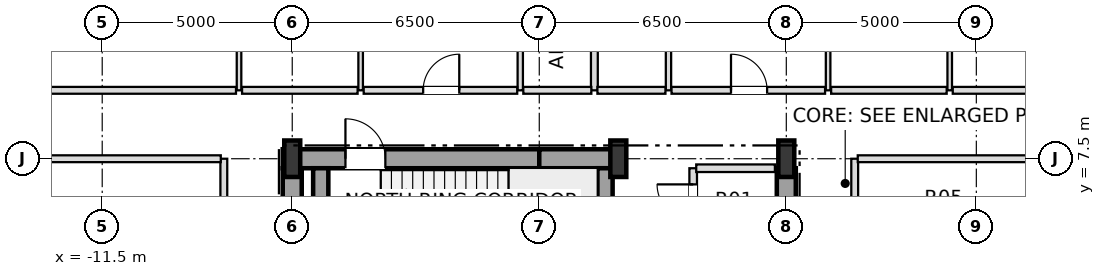
"""IFC4 building model, lengths in metres.
Left out: names, types, materials, properties, quantities, classifications, styles, units other than length and angle.
Written with IfcOpenShell. Run it as: python <this file> out.ifc"""

import sys

from ifc_helpers import new_model, si_unit, direction, frame, frame_2d, origin, origin_2d, place, context, subcontext, project, spatial, rectangle, i_section, extrude, element, fill, save


model = new_model("IFC4")
c1 = context("Model", 3, precision=1e-05, world=origin(), true_north=direction((0.0, 1.0)))
c2 = subcontext(c1, "Body", "Model", "MODEL_VIEW")
j1 = project(units=[si_unit("LENGTHUNIT", "METRE"), si_unit("PLANEANGLEUNIT", "RADIAN")], contexts=[c1])
p1 = place(None, origin())
s1 = spatial("IfcSite", under=j1, at=p1, CompositionType="ELEMENT")
p2 = place(p1, origin())
s2 = spatial("IfcBuilding", under=s1, at=p2, CompositionType="ELEMENT")
p3 = place(p2, frame((0.0, 0.0, 27.6)))
s3 = spatial("IfcBuildingStorey", under=s2, at=p3, CompositionType="ELEMENT", Elevation=27.6)
for number, where, z_axis, x_axis in (
    (1, (-6.5, 7.5, 0.0), (0.0, 0.0, 1.0), (1.0, 0.0, 0.0)),
    (2, (2.08, 7.5, 0.0), (0.0, 0.0, 1.0), (1.0, 0.0, 0.0)),
    (3, (6.5, 7.5, 0.0), (0.0, 0.0, 1.0), (1.0, 0.0, 0.0)),
):
    element("IfcColumn", number, at=place(p3, frame(where, z_axis=z_axis, x_axis=x_axis)), inside=s3, PredefinedType="COLUMN", context=c2, shape_type="SweptSolid", body=[
        extrude(i_section(OverallWidth=0.42, OverallDepth=0.96, WebThickness=0.022, FlangeThickness=0.034, at=origin_2d()), origin(), (0.0, 0.0, 1.0), 4.8),
    ])
p4 = place(p3, frame((-6.75, 7.5, 0.0), z_axis=(0.0, 0.0, 1.0), x_axis=(1.0, 0.0, 0.0)))
e4 = element("IfcWall", 4, at=p4, inside=s3, PredefinedType="SHEAR", context=c2, shape_type="SweptSolid", body=[
    extrude(rectangle(XDim=6.75, YDim=0.5, at=frame_2d((3.375, 0.0))), origin(), (0.0, 0.0, 1.0), 4.58),
])
p5 = place(p4, frame((1.65, 0.0, 0.0)))
e5 = element("IfcOpeningElement", 5, at=p5, cuts=e4, PredefinedType="OPENING", context=c2, shape_type="SweptSolid", body=[
    extrude(rectangle(XDim=1.05, YDim=2.15, at=frame_2d((0.525, 1.075))), frame((0.0, 0.26, 0.0), z_axis=(0.0, -1.0, 0.0), x_axis=(1.0, 0.0, 0.0)), (0.0, 0.0, 1.0), 0.52),
])
p6 = place(p3, frame((0.0, 7.5, 0.0), z_axis=(0.0, 0.0, 1.0), x_axis=(1.0, 0.0, 0.0)))
e6 = element("IfcWall", 6, at=p6, inside=s3, PredefinedType="SHEAR", context=c2, shape_type="SweptSolid", body=[
    extrude(rectangle(XDim=2.08, YDim=0.5, at=frame_2d((1.04, 0.0))), origin(), (0.0, 0.0, 1.0), 4.58),
])
for number, where, z_axis, x_axis in (
    (7, (-6.5, 3.95, 0.0), (0.0, 0.0, 1.0), (0.0, 1.0, 0.0)),
    (8, (6.5, 3.95, 0.0), (0.0, 0.0, 1.0), (0.0, 1.0, 0.0)),
):
    element("IfcWall", number, at=place(p3, frame(where, z_axis=z_axis, x_axis=x_axis)), inside=s3, PredefinedType="SHEAR", context=c2, shape_type="SweptSolid", body=[
        extrude(rectangle(XDim=3.3, YDim=0.5, at=frame_2d((1.65, 0.0))), origin(), (0.0, 0.0, 1.0), 4.58),
    ])
for number, where, z_axis, x_axis in (
    (9, (1.73, 3.95, 0.0), (0.0, 0.0, 1.0), (0.0, 1.0, 0.0)),
    (10, (-5.75, 3.95, 0.0), (0.0, 0.0, 1.0), (0.0, 1.0, 0.0)),
):
    element("IfcWall", number, at=place(p3, frame(where, z_axis=z_axis, x_axis=x_axis)), inside=s3, PredefinedType="SHEAR", context=c2, shape_type="SweptSolid", body=[
        extrude(rectangle(XDim=3.3, YDim=0.4, at=frame_2d((1.65, 0.0))), origin(), (0.0, 0.0, 1.0), 4.58),
    ])
p7 = place(p3, frame((-8.3, -7.5, 0.0), z_axis=(0.0, 0.0, 1.0), x_axis=(0.0, 1.0, 0.0)))
e11 = element("IfcWall", 11, at=p7, inside=s3, PredefinedType="PARTITIONING", context=c2, shape_type="SweptSolid", body=[
    extrude(rectangle(XDim=15.0, YDim=0.18, at=frame_2d((7.5, 0.0))), origin(), (0.0, 0.0, 1.0), 4.58),
])
p8 = place(p7, frame((2.965, 0.0, 0.0)))
e12 = element("IfcOpeningElement", 12, at=p8, cuts=e11, PredefinedType="OPENING", context=c2, shape_type="SweptSolid", body=[
    extrude(rectangle(XDim=0.95, YDim=2.15, at=frame_2d((0.475, 1.075))), frame((0.0, 0.1, 0.0), z_axis=(0.0, -1.0, 0.0), x_axis=(1.0, 0.0, 0.0)), (0.0, 0.0, 1.0), 0.2),
])
p9 = place(p7, frame((10.465, 0.0, 0.0)))
e13 = element("IfcOpeningElement", 13, at=p9, cuts=e11, PredefinedType="OPENING", context=c2, shape_type="SweptSolid", body=[
    extrude(rectangle(XDim=0.95, YDim=2.15, at=frame_2d((0.475, 1.075))), frame((0.0, 0.1, 0.0), z_axis=(0.0, -1.0, 0.0), x_axis=(1.0, 0.0, 0.0)), (0.0, 0.0, 1.0), 0.2),
])
p10 = place(p3, frame((-7.9, 9.3, 0.0), z_axis=(0.0, 0.0, 1.0), x_axis=(0.0, 1.0, 0.0)))
e14 = element("IfcWall", 14, at=p10, inside=s3, PredefinedType="PARTITIONING", context=c2, shape_type="SweptSolid", body=[
    extrude(rectangle(XDim=9.6, YDim=0.12, at=frame_2d((4.8, 0.0))), origin(), (0.0, 0.0, 1.0), 4.016),
])
p11 = place(p10, frame((4.35, 0.0, 0.0)))
e15 = element("IfcOpeningElement", 15, at=p11, cuts=e14, PredefinedType="OPENING", context=c2, shape_type="SweptSolid", body=[
    extrude(rectangle(XDim=0.9, YDim=2.1, at=frame_2d((0.45, 1.05))), frame((0.0, 0.07, 0.0), z_axis=(0.0, -1.0, 0.0), x_axis=(1.0, 0.0, 0.0)), (0.0, 0.0, 1.0), 0.14),
])
p12 = place(p3, frame((-4.7, 9.3, 0.0), z_axis=(0.0, 0.0, 1.0), x_axis=(0.0, 1.0, 0.0)))
e16 = element("IfcWall", 16, at=p12, inside=s3, PredefinedType="PARTITIONING", context=c2, shape_type="SweptSolid", body=[
    extrude(rectangle(XDim=9.6, YDim=0.12, at=frame_2d((4.8, 0.0))), origin(), (0.0, 0.0, 1.0), 4.148),
])
p13 = place(p12, frame((4.325, 0.0, 0.0)))
e17 = element("IfcOpeningElement", 17, at=p13, cuts=e16, PredefinedType="OPENING", context=c2, shape_type="SweptSolid", body=[
    extrude(rectangle(XDim=0.95, YDim=2.1, at=frame_2d((0.475, 1.05))), frame((0.0, 0.07, 0.0), z_axis=(0.0, -1.0, 0.0), x_axis=(1.0, 0.0, 0.0)), (0.0, 0.0, 1.0), 0.14),
])
p14 = place(p3, frame((-0.5, 9.3, 0.0), z_axis=(0.0, 0.0, 1.0), x_axis=(0.0, 1.0, 0.0)))
e18 = element("IfcWall", 18, at=p14, inside=s3, PredefinedType="PARTITIONING", context=c2, shape_type="SweptSolid", body=[
    extrude(rectangle(XDim=9.6, YDim=0.14, at=frame_2d((4.8, 0.0))), origin(), (0.0, 0.0, 1.0), 4.148),
])
p15 = place(p14, frame((4.35, 0.0, 0.0)))
e19 = element("IfcOpeningElement", 19, at=p15, cuts=e18, PredefinedType="OPENING", context=c2, shape_type="SweptSolid", body=[
    extrude(rectangle(XDim=0.9, YDim=2.1, at=frame_2d((0.45, 1.05))), frame((0.0, 0.08, 0.0), z_axis=(0.0, -1.0, 0.0), x_axis=(1.0, 0.0, 0.0)), (0.0, 0.0, 1.0), 0.16),
])
p16 = place(p3, frame((1.45, 9.3, 0.0), z_axis=(0.0, 0.0, 1.0), x_axis=(0.0, 1.0, 0.0)))
e20 = element("IfcWall", 20, at=p16, inside=s3, PredefinedType="PARTITIONING", context=c2, shape_type="SweptSolid", body=[
    extrude(rectangle(XDim=15.6, YDim=0.18, at=frame_2d((7.8, 0.0))), origin(), (0.0, 0.0, 1.0), 4.016),
])
p17 = place(p3, frame((3.4, 9.3, 0.0), z_axis=(0.0, 0.0, 1.0), x_axis=(0.0, 1.0, 0.0)))
e21 = element("IfcWall", 21, at=p17, inside=s3, PredefinedType="PARTITIONING", context=c2, shape_type="SweptSolid", body=[
    extrude(rectangle(XDim=9.6, YDim=0.14, at=frame_2d((4.8, 0.0))), origin(), (0.0, 0.0, 1.0), 4.148),
])
p18 = place(p17, frame((4.35, 0.0, 0.0)))
e22 = element("IfcOpeningElement", 22, at=p18, cuts=e21, PredefinedType="OPENING", context=c2, shape_type="SweptSolid", body=[
    extrude(rectangle(XDim=0.9, YDim=2.1, at=frame_2d((0.45, 1.05))), frame((0.0, 0.08, 0.0), z_axis=(0.0, -1.0, 0.0), x_axis=(1.0, 0.0, 0.0)), (0.0, 0.0, 1.0), 0.16),
])
p19 = place(p3, frame((4.05, 5.55, 0.0), z_axis=(0.0, 0.0, 1.0), x_axis=(0.0, 1.0, 0.0)))
e23 = element("IfcWall", 23, at=p19, inside=s3, PredefinedType="SOLIDWALL", context=c2, shape_type="SweptSolid", body=[
    extrude(rectangle(XDim=1.7, YDim=0.2, at=frame_2d((0.85, 0.0))), origin(), (0.0, 0.0, 1.0), 4.58),
])
p20 = place(p19, frame((0.325, 0.0, 0.0)))
e24 = element("IfcOpeningElement", 24, at=p20, cuts=e23, PredefinedType="OPENING", context=c2, shape_type="SweptSolid", body=[
    extrude(rectangle(XDim=0.95, YDim=2.15, at=frame_2d((0.475, 1.075))), frame((0.0, 0.11, 0.0), z_axis=(0.0, -1.0, 0.0), x_axis=(1.0, 0.0, 0.0)), (0.0, 0.0, 1.0), 0.22),
])
p21 = place(p3, frame((7.6, 9.3, 0.0), z_axis=(0.0, 0.0, 1.0), x_axis=(0.0, 1.0, 0.0)))
e25 = element("IfcWall", 25, at=p21, inside=s3, PredefinedType="PARTITIONING", context=c2, shape_type="SweptSolid", body=[
    extrude(rectangle(XDim=15.6, YDim=0.12, at=frame_2d((7.8, 0.0))), origin(), (0.0, 0.0, 1.0), 4.016),
])
p22 = place(p21, frame((4.325, 0.0, 0.0)))
e26 = element("IfcOpeningElement", 26, at=p22, cuts=e25, PredefinedType="OPENING", context=c2, shape_type="SweptSolid", body=[
    extrude(rectangle(XDim=0.95, YDim=2.1, at=frame_2d((0.475, 1.05))), frame((0.0, 0.07, 0.0), z_axis=(0.0, -1.0, 0.0), x_axis=(1.0, 0.0, 0.0)), (0.0, 0.0, 1.0), 0.14),
])
p23 = place(p21, frame((12.15, 0.0, 0.0)))
e27 = element("IfcOpeningElement", 27, at=p23, cuts=e25, PredefinedType="OPENING", context=c2, shape_type="SweptSolid", body=[
    extrude(rectangle(XDim=0.9, YDim=2.1, at=frame_2d((0.45, 1.05))), frame((0.0, 0.07, 0.0), z_axis=(0.0, -1.0, 0.0), x_axis=(1.0, 0.0, 0.0)), (0.0, 0.0, 1.0), 0.14),
])
p24 = place(p3, frame((8.3, -7.5, 0.0), z_axis=(0.0, 0.0, 1.0), x_axis=(0.0, 1.0, 0.0)))
e28 = element("IfcWall", 28, at=p24, inside=s3, PredefinedType="PARTITIONING", context=c2, shape_type="SweptSolid", body=[
    extrude(rectangle(XDim=15.0, YDim=0.18, at=frame_2d((7.5, 0.0))), origin(), (0.0, 0.0, 1.0), 4.58),
])
p25 = place(p24, frame((2.995, 0.0, 0.0)))
e29 = element("IfcOpeningElement", 29, at=p25, cuts=e28, PredefinedType="OPENING", context=c2, shape_type="SweptSolid", body=[
    extrude(rectangle(XDim=0.95, YDim=2.15, at=frame_2d((0.475, 1.075))), frame((0.0, 0.1, 0.0), z_axis=(0.0, -1.0, 0.0), x_axis=(1.0, 0.0, 0.0)), (0.0, 0.0, 1.0), 0.2),
])
p26 = place(p24, frame((10.495, 0.0, 0.0)))
e30 = element("IfcOpeningElement", 30, at=p26, cuts=e28, PredefinedType="OPENING", context=c2, shape_type="SweptSolid", body=[
    extrude(rectangle(XDim=0.95, YDim=2.15, at=frame_2d((0.475, 1.075))), frame((0.0, 0.1, 0.0), z_axis=(0.0, -1.0, 0.0), x_axis=(1.0, 0.0, 0.0)), (0.0, 0.0, 1.0), 0.2),
])
p27 = place(p3, frame((10.8, 9.3, 0.0), z_axis=(0.0, 0.0, 1.0), x_axis=(0.0, 1.0, 0.0)))
e31 = element("IfcWall", 31, at=p27, inside=s3, PredefinedType="PARTITIONING", context=c2, shape_type="SweptSolid", body=[
    extrude(rectangle(XDim=9.6, YDim=0.12, at=frame_2d((4.8, 0.0))), origin(), (0.0, 0.0, 1.0), 4.016),
])
p28 = place(p27, frame((4.325, 0.0, 0.0)))
e32 = element("IfcOpeningElement", 32, at=p28, cuts=e31, PredefinedType="OPENING", context=c2, shape_type="SweptSolid", body=[
    extrude(rectangle(XDim=0.95, YDim=2.1, at=frame_2d((0.475, 1.05))), frame((0.0, 0.07, 0.0), z_axis=(0.0, -1.0, 0.0), x_axis=(1.0, 0.0, 0.0)), (0.0, 0.0, 1.0), 0.14),
])
p29 = place(p3, frame((4.13, 7.25, 0.0), z_axis=(0.0, 0.0, 1.0), x_axis=(1.0, 0.0, 0.0)))
e33 = element("IfcWall", 33, at=p29, inside=s3, PredefinedType="SOLIDWALL", context=c2, shape_type="SweptSolid", body=[
    extrude(rectangle(XDim=2.07, YDim=0.2, at=frame_2d((1.035, 0.0))), origin(), (0.0, 0.0, 1.0), 4.58),
])
for number, where, z_axis, x_axis in (
    (34, (-16.02, 7.5, 0.0), (0.0, 0.0, 1.0), (1.0, 0.0, 0.0)),
    (35, (8.38, 7.5, 0.0), (0.0, 0.0, 1.0), (1.0, 0.0, 0.0)),
):
    element("IfcWall", number, at=place(p3, frame(where, z_axis=z_axis, x_axis=x_axis)), inside=s3, PredefinedType="PARTITIONING", context=c2, shape_type="SweptSolid", body=[
        extrude(rectangle(XDim=7.64, YDim=0.18, at=frame_2d((3.82, 0.0))), origin(), (0.0, 0.0, 1.0), 4.016),
    ])
p30 = place(p3, frame((-18.32, 9.3, 0.0), z_axis=(0.0, 0.0, 1.0), x_axis=(1.0, 0.0, 0.0)))
e36 = element("IfcWall", 36, at=p30, inside=s3, PredefinedType="PARTITIONING", context=c2, shape_type="SweptSolid", body=[
    extrude(rectangle(XDim=10.34, YDim=0.18, at=frame_2d((5.17, 0.0))), origin(), (0.0, 0.0, 1.0), 4.016),
])
p31 = place(p3, frame((-7.82, 9.3, 0.0), z_axis=(0.0, 0.0, 1.0), x_axis=(1.0, 0.0, 0.0)))
e37 = element("IfcWall", 37, at=p31, inside=s3, PredefinedType="PARTITIONING", context=c2, shape_type="SweptSolid", body=[
    extrude(rectangle(XDim=3.04, YDim=0.18, at=frame_2d((1.52, 0.0))), origin(), (0.0, 0.0, 1.0), 4.016),
])
p32 = place(p3, frame((-4.62, 9.3, 0.0), z_axis=(0.0, 0.0, 1.0), x_axis=(1.0, 0.0, 0.0)))
e38 = element("IfcWall", 38, at=p32, inside=s3, PredefinedType="PARTITIONING", context=c2, shape_type="SweptSolid", body=[
    extrude(rectangle(XDim=4.04, YDim=0.18, at=frame_2d((2.02, 0.0))), origin(), (0.0, 0.0, 1.0), 4.58),
])
p33 = place(p32, frame((1.565, 0.0, 0.0)))
e39 = element("IfcOpeningElement", 39, at=p33, cuts=e38, PredefinedType="OPENING", context=c2, shape_type="SweptSolid", body=[
    extrude(rectangle(XDim=0.95, YDim=2.15, at=frame_2d((0.475, 1.075))), frame((0.0, 0.1, 0.0), z_axis=(0.0, -1.0, 0.0), x_axis=(1.0, 0.0, 0.0)), (0.0, 0.0, 1.0), 0.2),
])
for number, where, z_axis, x_axis in (
    (40, (-0.42, 9.3, 0.0), (0.0, 0.0, 1.0), (1.0, 0.0, 0.0)),
    (41, (1.53, 9.3, 0.0), (0.0, 0.0, 1.0), (1.0, 0.0, 0.0)),
):
    element("IfcWall", number, at=place(p3, frame(where, z_axis=z_axis, x_axis=x_axis)), inside=s3, PredefinedType="PARTITIONING", context=c2, shape_type="SweptSolid", body=[
        extrude(rectangle(XDim=1.79, YDim=0.18, at=frame_2d((0.895, 0.0))), origin(), (0.0, 0.0, 1.0), 4.58),
    ])
p34 = place(p3, frame((3.48, 9.3, 0.0), z_axis=(0.0, 0.0, 1.0), x_axis=(1.0, 0.0, 0.0)))
e42 = element("IfcWall", 42, at=p34, inside=s3, PredefinedType="PARTITIONING", context=c2, shape_type="SweptSolid", body=[
    extrude(rectangle(XDim=4.04, YDim=0.18, at=frame_2d((2.02, 0.0))), origin(), (0.0, 0.0, 1.0), 4.016),
])
p35 = place(p34, frame((1.565, 0.0, 0.0)))
e43 = element("IfcOpeningElement", 43, at=p35, cuts=e42, PredefinedType="OPENING", context=c2, shape_type="SweptSolid", body=[
    extrude(rectangle(XDim=0.95, YDim=2.15, at=frame_2d((0.475, 1.075))), frame((0.0, 0.1, 0.0), z_axis=(0.0, -1.0, 0.0), x_axis=(1.0, 0.0, 0.0)), (0.0, 0.0, 1.0), 0.2),
])
p36 = place(p3, frame((7.68, 9.3, 0.0), z_axis=(0.0, 0.0, 1.0), x_axis=(1.0, 0.0, 0.0)))
e44 = element("IfcWall", 44, at=p36, inside=s3, PredefinedType="PARTITIONING", context=c2, shape_type="SweptSolid", body=[
    extrude(rectangle(XDim=3.04, YDim=0.18, at=frame_2d((1.52, 0.0))), origin(), (0.0, 0.0, 1.0), 4.58),
])
p37 = place(p3, frame((10.88, 9.3, 0.0), z_axis=(0.0, 0.0, 1.0), x_axis=(1.0, 0.0, 0.0)))
e45 = element("IfcWall", 45, at=p37, inside=s3, PredefinedType="PARTITIONING", context=c2, shape_type="SweptSolid", body=[
    extrude(rectangle(XDim=7.44, YDim=0.18, at=frame_2d((3.72, 0.0))), origin(), (0.0, 0.0, 1.0), 4.016),
])
p38 = place(p5, origin())
e46 = element("IfcDoor", 46, at=p38, inside=s3, OperationType="SINGLE_SWING_LEFT", PredefinedType="DOOR", context=c2, shape_type="SweptSolid", body=[
    extrude(rectangle(XDim=1.05, YDim=2.15, at=frame_2d((0.525, 1.075))), frame((0.0, 0.025, 0.0), z_axis=(0.0, -1.0, 0.0), x_axis=(1.0, 0.0, 0.0)), (0.0, 0.0, 1.0), 0.05),
])
fill(e5, e46)
p39 = place(p20, origin())
e47 = element("IfcDoor", 47, at=p39, inside=s3, OperationType="SINGLE_SWING_RIGHT", PredefinedType="DOOR", context=c2, shape_type="SweptSolid", body=[
    extrude(rectangle(XDim=0.95, YDim=2.15, at=frame_2d((0.475, 1.075))), frame((0.0, 0.025, 0.0), z_axis=(0.0, -1.0, 0.0), x_axis=(1.0, 0.0, 0.0)), (0.0, 0.0, 1.0), 0.05),
])
fill(e24, e47)
p40 = place(p33, origin())
e48 = element("IfcDoor", 48, at=p40, inside=s3, OperationType="SINGLE_SWING_RIGHT", PredefinedType="DOOR", context=c2, shape_type="SweptSolid", body=[
    extrude(rectangle(XDim=0.95, YDim=2.15, at=frame_2d((0.475, 1.075))), frame((0.0, 0.025, 0.0), z_axis=(0.0, -1.0, 0.0), x_axis=(1.0, 0.0, 0.0)), (0.0, 0.0, 1.0), 0.05),
])
fill(e39, e48)
p41 = place(p35, origin())
e49 = element("IfcDoor", 49, at=p41, inside=s3, OperationType="SINGLE_SWING_LEFT", PredefinedType="DOOR", context=c2, shape_type="SweptSolid", body=[
    extrude(rectangle(XDim=0.95, YDim=2.15, at=frame_2d((0.475, 1.075))), frame((0.0, 0.025, 0.0), z_axis=(0.0, -1.0, 0.0), x_axis=(1.0, 0.0, 0.0)), (0.0, 0.0, 1.0), 0.05),
])
fill(e43, e49)
save(model, sys.argv[1])
